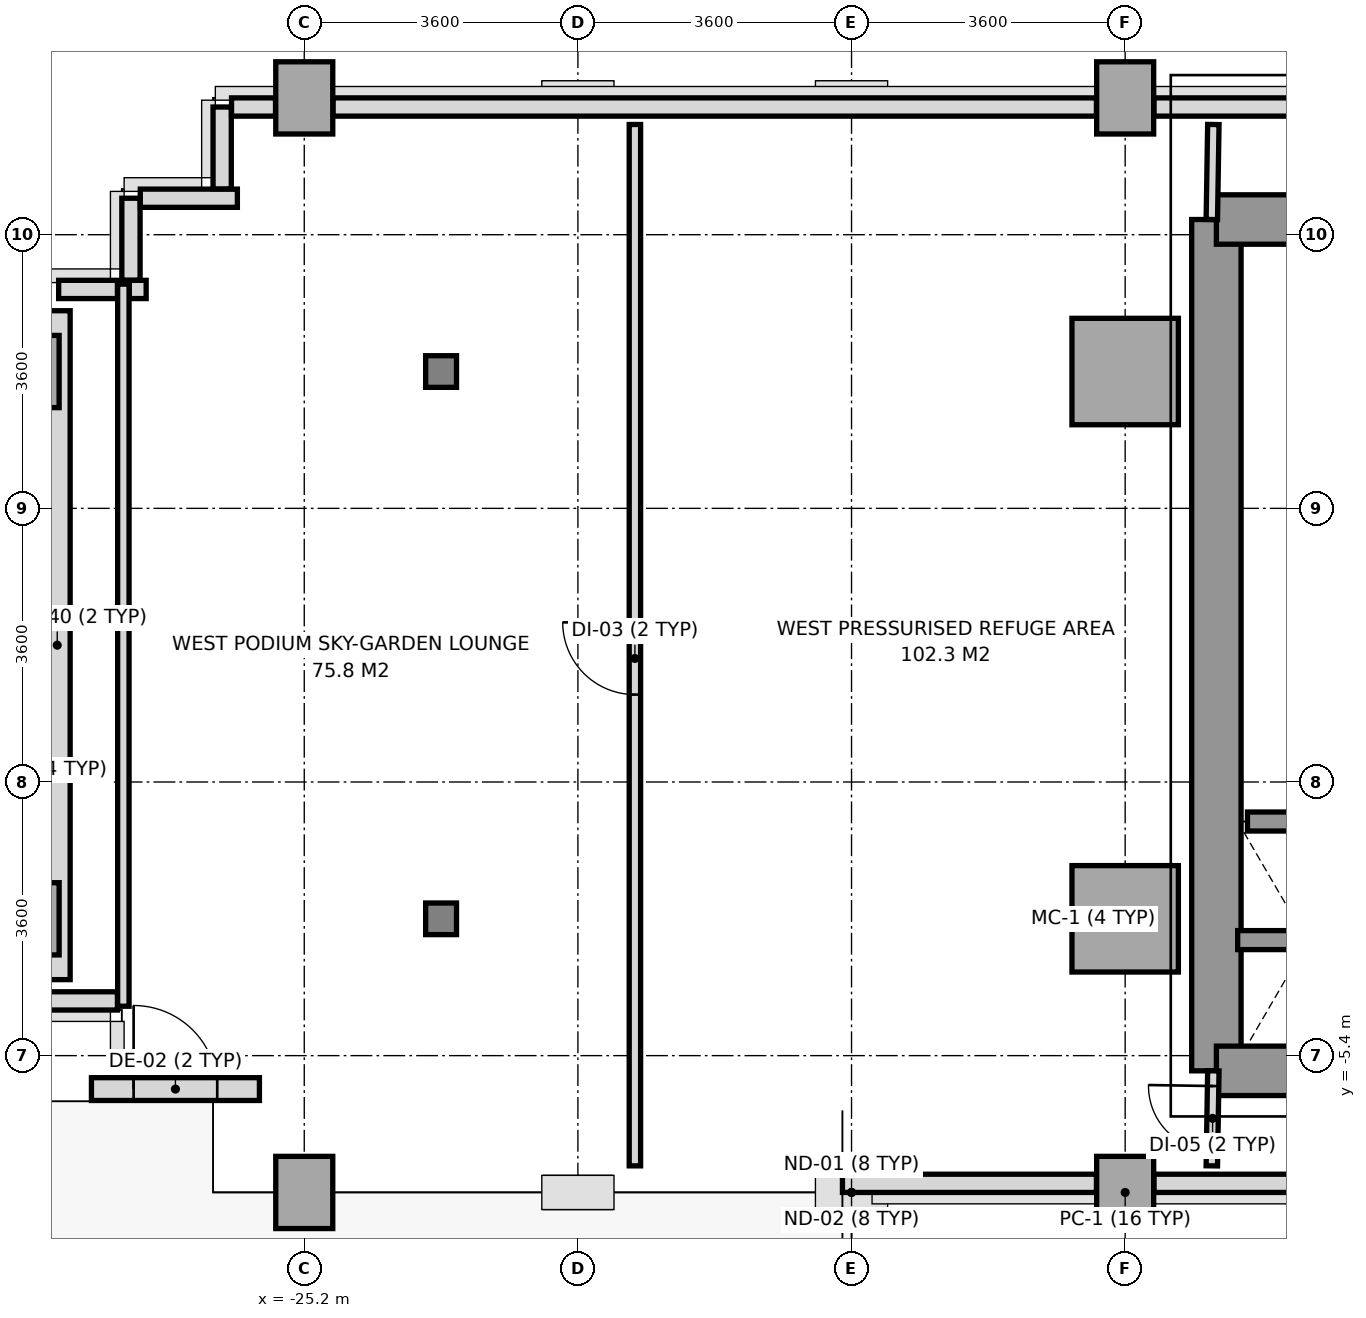
"""IFC4 building model, lengths in metres.
Left out: names, types, materials, properties, quantities, classifications, styles, units other than length and angle.
Written with IfcOpenShell. Run it as: python <this file> out.ifc"""

import sys

from ifc_helpers import new_model, si_unit, direction, frame, frame_2d, origin, origin_2d, place, context, subcontext, project, spatial, rectangle, i_section, extrude, source, transform, mapped, element, fill, save


model = new_model("IFC4")
c1 = context("Model", 3, precision=1e-05, world=origin(), true_north=direction((0.0, 1.0)))
c2 = subcontext(c1, "Body", "Model", "MODEL_VIEW")
j1 = project(units=[si_unit("LENGTHUNIT", "METRE"), si_unit("PLANEANGLEUNIT", "RADIAN")], contexts=[c1])
p1 = place(None, origin())
s1 = spatial("IfcSite", under=j1, at=p1, CompositionType="ELEMENT")
p2 = place(p1, origin())
s2 = spatial("IfcBuilding", under=s1, at=p2, CompositionType="ELEMENT")
p3 = place(p2, frame((0.0, 0.0, 25.2)))
s3 = spatial("IfcBuildingStorey", under=s2, at=p3, CompositionType="ELEMENT", Elevation=25.2)
m1 = source(origin(), c2, "Body", "SweptSolid", [
    extrude(rectangle(XDim=0.75, YDim=0.95, at=origin_2d()), origin(), (0.0, 0.0, 1.0), 5.2),
])
for number, where, z_axis, x_axis in (
    (1, (-28.8, -3.6, 0.0), (0.0, 0.0, 1.0), (1.0, 0.0, 0.0)),
    (2, (-28.8, 3.6, 0.0), (0.0, 0.0, 1.0), (1.0, 0.0, 0.0)),
    (3, (-25.2, -7.2, 0.0), (0.0, 0.0, 1.0), (1.0, 0.0, 0.0)),
    (4, (-25.2, 7.2, 0.0), (0.0, 0.0, 1.0), (1.0, 0.0, 0.0)),
):
    element("IfcColumn", number, at=place(p3, frame(where, z_axis=z_axis, x_axis=x_axis)), inside=s3, PredefinedType="COLUMN", context=c2, shape_type="MappedRepresentation", body=[
        mapped(m1, transform((0.0, 0.0, 0.0), x_axis=(1.0, 0.0, 0.0), y_axis=(0.0, 1.0, 0.0), z_axis=(0.0, 0.0, 1.0), scale=1.0)),
    ])
m2 = source(origin(), c2, "Body", "SweptSolid", [
    extrude(i_section(OverallWidth=0.406, OverallDepth=0.416, WebThickness=0.024, FlangeThickness=0.039, at=origin_2d()), origin(), (0.0, 0.0, 1.0), 5.2),
])
for number, where, z_axis, x_axis in (
    (5, (-23.4, -3.6, 0.0), (0.0, 0.0, 1.0), (1.0, 0.0, 0.0)),
    (6, (-23.4, 3.6, 0.0), (0.0, 0.0, 1.0), (1.0, 0.0, 0.0)),
):
    element("IfcColumn", number, at=place(p3, frame(where, z_axis=z_axis, x_axis=x_axis)), inside=s3, PredefinedType="COLUMN", context=c2, shape_type="MappedRepresentation", body=[
        mapped(m2, transform((0.0, 0.0, 0.0), x_axis=(1.0, 0.0, 0.0), y_axis=(0.0, 1.0, 0.0), z_axis=(0.0, 0.0, 1.0), scale=1.0)),
    ])
p4 = place(p3, frame((-14.4, -7.2, 0.0), z_axis=(0.0, 0.0, 1.0), x_axis=(1.0, 0.0, 0.0)))
e7 = element("IfcColumn", 7, at=p4, inside=s3, PredefinedType="COLUMN", context=c2, shape_type="MappedRepresentation", body=[
    mapped(m1, transform((0.0, 0.0, 0.0), x_axis=(1.0, 0.0, 0.0), y_axis=(0.0, 1.0, 0.0), z_axis=(0.0, 0.0, 1.0), scale=1.0)),
])
m3 = source(origin(), c2, "Body", "SweptSolid", [
    extrude(rectangle(XDim=1.4, YDim=1.4, at=origin_2d()), origin(), (0.0, 0.0, 1.0), 5.2),
])
for number, where, z_axis, x_axis in (
    (8, (-14.4, -3.6, 0.0), (0.0, 0.0, 1.0), (1.0, 0.0, 0.0)),
    (9, (-14.4, 3.6, 0.0), (0.0, 0.0, 1.0), (1.0, 0.0, 0.0)),
):
    element("IfcColumn", number, at=place(p3, frame(where, z_axis=z_axis, x_axis=x_axis)), inside=s3, PredefinedType="COLUMN", context=c2, shape_type="MappedRepresentation", body=[
        mapped(m3, transform((0.0, 0.0, 0.0), x_axis=(1.0, 0.0, 0.0), y_axis=(0.0, 1.0, 0.0), z_axis=(0.0, 0.0, 1.0), scale=1.0)),
    ])
p5 = place(p3, frame((-14.4, 7.2, 0.0), z_axis=(0.0, 0.0, 1.0), x_axis=(1.0, 0.0, 0.0)))
e10 = element("IfcColumn", 10, at=p5, inside=s3, PredefinedType="COLUMN", context=c2, shape_type="MappedRepresentation", body=[
    mapped(m1, transform((0.0, 0.0, 0.0), x_axis=(1.0, 0.0, 0.0), y_axis=(0.0, 1.0, 0.0), z_axis=(0.0, 0.0, 1.0), scale=1.0)),
])
p6 = place(p3, frame((-28.45, -4.4, 0.0), z_axis=(0.0, 0.0, 1.0), x_axis=(0.0, 1.0, 0.0)))
e11 = element("IfcWall", 11, at=p6, inside=s3, PredefinedType="SOLIDWALL", context=c2, shape_type="SweptSolid", body=[
    extrude(rectangle(XDim=8.8, YDim=0.34, at=frame_2d((4.4, 0.0))), origin(), (0.0, 0.0, 1.0), 4.386),
])
p7 = place(p3, frame((-28.0, -5.84, 0.0), z_axis=(0.0, 0.0, 1.0), x_axis=(1.0, 0.0, 0.0)))
e12 = element("IfcWall", 12, at=p7, inside=s3, PredefinedType="SOLIDWALL", context=c2, shape_type="SweptSolid", body=[
    extrude(rectangle(XDim=2.21, YDim=0.3, at=frame_2d((1.105, 0.0))), origin(), (0.0, 0.0, 1.0), 3.4),
])
p8 = place(p7, frame((0.555, 0.0, 0.0)))
e13 = element("IfcOpeningElement", 13, at=p8, cuts=e12, PredefinedType="OPENING", context=c2, shape_type="SweptSolid", body=[
    extrude(rectangle(XDim=1.1, YDim=2.3, at=frame_2d((0.55, 1.15))), frame((0.0, 0.16, 0.0), z_axis=(0.0, -1.0, 0.0), x_axis=(1.0, 0.0, 0.0)), (0.0, 0.0, 1.0), 0.32),
])
p9 = place(p3, frame((-9.603, -7.08, 0.0), z_axis=(0.0, 0.0, 1.0), x_axis=(-1.0, 0.0, 0.0)))
e14 = element("IfcWall", 14, at=p9, inside=s3, PredefinedType="PARAPET", context=c2, shape_type="SweptSolid", body=[
    extrude(rectangle(XDim=4.419, YDim=0.24, at=frame_2d((2.209, 0.0))), origin(), (0.0, 0.0, 1.0), 1.15),
])
p10 = place(p3, frame((-14.778, -7.08, 0.0), z_axis=(0.0, 0.0, 1.0), x_axis=(-1.0, 0.0, 0.0)))
e15 = element("IfcWall", 15, at=p10, inside=s3, PredefinedType="PARAPET", context=c2, shape_type="SweptSolid", body=[
    extrude(rectangle(XDim=3.341, YDim=0.24, at=frame_2d((1.671, 0.0))), origin(), (0.0, 0.0, 1.0), 1.15),
])
p11 = place(p3, frame((-27.658, -4.68, 0.0), z_axis=(0.0, 0.0, 1.0), x_axis=(-1.0, 0.0, 0.0)))
e16 = element("IfcWall", 16, at=p11, inside=s3, PredefinedType="PARAPET", context=c2, shape_type="SweptSolid", body=[
    extrude(rectangle(XDim=1.022, YDim=0.24, at=frame_2d((0.511, 0.0))), origin(), (0.0, 0.0, 1.0), 1.15),
])
p12 = place(p3, frame((-28.431, 4.68, 0.0), z_axis=(0.0, 0.0, 1.0), x_axis=(1.0, 0.0, 0.0)))
e17 = element("IfcWall", 17, at=p12, inside=s3, PredefinedType="PARAPET", context=c2, shape_type="SweptSolid", body=[
    extrude(rectangle(XDim=0.773, YDim=0.24, at=frame_2d((0.387, 0.0))), origin(), (0.0, 0.0, 1.0), 1.15),
])
p13 = place(p3, frame((-27.502, 4.68, 0.0), z_axis=(0.0, 0.0, 1.0), x_axis=(1.0, 0.0, 0.0)))
e18 = element("IfcWall", 18, at=p13, inside=s3, PredefinedType="PARAPET", context=c2, shape_type="SweptSolid", body=[
    extrude(rectangle(XDim=0.222, YDim=0.24, at=frame_2d((0.111, 0.0))), origin(), (0.0, 0.0, 1.0), 1.15),
])
p14 = place(p3, frame((-27.48, 4.803, 0.0), z_axis=(0.0, 0.0, 1.0), x_axis=(0.0, 1.0, 0.0)))
e19 = element("IfcWall", 19, at=p14, inside=s3, PredefinedType="PARAPET", context=c2, shape_type="SweptSolid", body=[
    extrude(rectangle(XDim=1.077, YDim=0.24, at=frame_2d((0.539, 0.0))), origin(), (0.0, 0.0, 1.0), 1.15),
])
p15 = place(p3, frame((-27.357, 5.88, 0.0), z_axis=(0.0, 0.0, 1.0), x_axis=(1.0, 0.0, 0.0)))
e20 = element("IfcWall", 20, at=p15, inside=s3, PredefinedType="PARAPET", context=c2, shape_type="SweptSolid", body=[
    extrude(rectangle(XDim=1.277, YDim=0.24, at=frame_2d((0.638, 0.0))), origin(), (0.0, 0.0, 1.0), 1.15),
])
p16 = place(p3, frame((-26.28, 6.003, 0.0), z_axis=(0.0, 0.0, 1.0), x_axis=(0.0, 1.0, 0.0)))
e21 = element("IfcWall", 21, at=p16, inside=s3, PredefinedType="PARAPET", context=c2, shape_type="SweptSolid", body=[
    extrude(rectangle(XDim=1.077, YDim=0.24, at=frame_2d((0.539, 0.0))), origin(), (0.0, 0.0, 1.0), 1.15),
])
p17 = place(p3, frame((-26.157, 7.08, 0.0), z_axis=(0.0, 0.0, 1.0), x_axis=(1.0, 0.0, 0.0)))
e22 = element("IfcWall", 22, at=p17, inside=s3, PredefinedType="PARAPET", context=c2, shape_type="SweptSolid", body=[
    extrude(rectangle(XDim=0.579, YDim=0.24, at=frame_2d((0.29, 0.0))), origin(), (0.0, 0.0, 1.0), 1.15),
])
p18 = place(p3, frame((-24.822, 7.08, 0.0), z_axis=(0.0, 0.0, 1.0), x_axis=(1.0, 0.0, 0.0)))
e23 = element("IfcWall", 23, at=p18, inside=s3, PredefinedType="PARAPET", context=c2, shape_type="SweptSolid", body=[
    extrude(rectangle(XDim=10.044, YDim=0.24, at=frame_2d((5.022, 0.0))), origin(), (0.0, 0.0, 1.0), 1.15),
])
p19 = place(p3, frame((-14.022, 7.08, 0.0), z_axis=(0.0, 0.0, 1.0), x_axis=(1.0, 0.0, 0.0)))
e24 = element("IfcWall", 24, at=p19, inside=s3, PredefinedType="PARAPET", context=c2, shape_type="SweptSolid", body=[
    extrude(rectangle(XDim=2.727, YDim=0.24, at=frame_2d((1.364, 0.0))), origin(), (0.0, 0.0, 1.0), 1.15),
])
p20 = place(p3, frame((-13.2, -5.6, 0.0), z_axis=(0.0, 0.0, 1.0), x_axis=(0.0, 1.0, 0.0)))
e25 = element("IfcWall", 25, at=p20, inside=s3, PredefinedType="SHEAR", context=c2, shape_type="SweptSolid", body=[
    extrude(rectangle(XDim=11.2, YDim=0.65, at=frame_2d((5.6, 0.0))), origin(), (0.0, 0.0, 1.0), 5.2),
])
p21 = place(p3, frame((-13.2, 5.6, 0.0), z_axis=(0.0, 0.0, 1.0), x_axis=(1.0, 0.0, 0.0)))
e26 = element("IfcWall", 26, at=p21, inside=s3, PredefinedType="SHEAR", context=c2, shape_type="SweptSolid", body=[
    extrude(rectangle(XDim=1.819, YDim=0.65, at=frame_2d((0.909, 0.0))), origin(), (0.0, 0.0, 1.0), 5.2),
])
p22 = place(p3, frame((-13.2, -5.6, 0.0), z_axis=(0.0, 0.0, 1.0), x_axis=(1.0, 0.0, 0.0)))
e27 = element("IfcWall", 27, at=p22, inside=s3, PredefinedType="SHEAR", context=c2, shape_type="SweptSolid", body=[
    extrude(rectangle(XDim=7.8, YDim=0.65, at=frame_2d((3.9, 0.0))), origin(), (0.0, 0.0, 1.0), 5.2),
])
p23 = place(p22, frame((3.6, 0.0, 0.0)))
e28 = element("IfcOpeningElement", 28, at=p23, cuts=e27, PredefinedType="OPENING", context=c2, shape_type="SweptSolid", body=[
    extrude(rectangle(XDim=1.2, YDim=2.2, at=frame_2d((0.6, 1.1))), frame((0.0, 0.335, 0.0), z_axis=(0.0, -1.0, 0.0), x_axis=(1.0, 0.0, 0.0)), (0.0, 0.0, 1.0), 0.67),
])
p24 = place(p3, frame((-12.92, -3.88, 0.0), z_axis=(0.0, 0.0, 1.0), x_axis=(1.0, 0.0, 0.0)))
e29 = element("IfcWall", 29, at=p24, inside=s3, PredefinedType="SOLIDWALL", context=c2, shape_type="SweptSolid", body=[
    extrude(rectangle(XDim=1.84, YDim=0.25, at=frame_2d((0.92, 0.0))), origin(), (0.0, 0.0, 1.0), 5.2),
])
p25 = place(p3, frame((-12.791, -2.32, 0.0), z_axis=(0.0, 0.0, 1.0), x_axis=(1.0, 0.0, 0.0)))
e30 = element("IfcWall", 30, at=p25, inside=s3, PredefinedType="SOLIDWALL", context=c2, shape_type="SweptSolid", body=[
    extrude(rectangle(XDim=1.582, YDim=0.25, at=frame_2d((0.791, 0.0))), origin(), (0.0, 0.0, 1.0), 5.2),
])
p26 = place(p3, frame((-27.58, -4.75, 0.0), z_axis=(0.0, 0.0, 1.0), x_axis=(0.0, 1.0, 0.0)))
e31 = element("IfcWall", 31, at=p26, inside=s3, PredefinedType="PARTITIONING", context=c2, shape_type="SweptSolid", body=[
    extrude(rectangle(XDim=9.5, YDim=0.15, at=frame_2d((4.75, 0.0))), origin(), (0.0, 0.0, 1.0), 4.386),
])
p27 = place(p3, frame((-13.26, -6.85, 0.0), z_axis=(0.0, 0.0, 1.0), x_axis=(0.016013571389, 0.999871774545, 0.0)))
e32 = element("IfcWall", 32, at=p27, inside=s3, PredefinedType="PARTITIONING", context=c2, shape_type="SweptSolid", body=[
    extrude(rectangle(XDim=1.25, YDim=0.15, at=frame_2d((0.625, 0.0))), origin(), (0.0, 0.0, 1.0), 5.2),
])
p28 = place(p27, frame((0.2, 0.0, 0.0)))
e33 = element("IfcOpeningElement", 33, at=p28, cuts=e32, PredefinedType="OPENING", context=c2, shape_type="SweptSolid", body=[
    extrude(rectangle(XDim=0.85, YDim=2.1, at=frame_2d((0.425, 1.05))), frame((0.0, 0.085, 0.0), z_axis=(0.0, -1.0, 0.0), x_axis=(1.0, 0.0, 0.0)), (0.0, 0.0, 1.0), 0.17),
])
p29 = place(p3, frame((-13.26, 5.6, 0.0), z_axis=(0.0, 0.0, 1.0), x_axis=(0.016013571389, 0.999871774545, 0.0)))
e34 = element("IfcWall", 34, at=p29, inside=s3, PredefinedType="PARTITIONING", context=c2, shape_type="SweptSolid", body=[
    extrude(rectangle(XDim=1.25, YDim=0.15, at=frame_2d((0.625, 0.0))), origin(), (0.0, 0.0, 1.0), 5.2),
])
p30 = place(p3, frame((-20.85, -6.85, 0.0), z_axis=(0.0, 0.0, 1.0), x_axis=(0.0, 1.0, 0.0)))
e35 = element("IfcWall", 35, at=p30, inside=s3, PredefinedType="PARTITIONING", context=c2, shape_type="SweptSolid", body=[
    extrude(rectangle(XDim=13.7, YDim=0.15, at=frame_2d((6.85, 0.0))), origin(), (0.0, 0.0, 1.0), 3.4),
])
p31 = place(p30, frame((6.2, 0.0, 0.0)))
e36 = element("IfcOpeningElement", 36, at=p31, cuts=e35, PredefinedType="OPENING", context=c2, shape_type="SweptSolid", body=[
    extrude(rectangle(XDim=0.95, YDim=2.15, at=frame_2d((0.475, 1.075))), frame((0.0, 0.085, 0.0), z_axis=(0.0, -1.0, 0.0), x_axis=(1.0, 0.0, 0.0)), (0.0, 0.0, 1.0), 0.17),
])
m4 = source(origin(), c2, "Body", "SweptSolid", [
    extrude(rectangle(XDim=1.1, YDim=2.3, at=frame_2d((0.55, 1.15))), frame((0.0, 0.025, 0.0), z_axis=(0.0, -1.0, 0.0), x_axis=(1.0, 0.0, 0.0)), (0.0, 0.0, 1.0), 0.05),
])
p32 = place(p8, frame((1.1, 0.0, 0.0), z_axis=(0.0, 0.0, 1.0), x_axis=(-1.0, 0.0, 0.0)))
e37 = element("IfcDoor", 37, at=p32, inside=s3, OperationType="SINGLE_SWING_LEFT", PredefinedType="DOOR", context=c2, shape_type="MappedRepresentation", body=[
    mapped(m4, transform((0.0, 0.0, 0.0), x_axis=(1.0, 0.0, 0.0), y_axis=(0.0, 1.0, 0.0), z_axis=(0.0, 0.0, 1.0), scale=1.0)),
])
fill(e13, e37)
m5 = source(origin(), c2, "Body", "SweptSolid", [
    extrude(rectangle(XDim=0.95, YDim=2.15, at=frame_2d((0.475, 1.075))), frame((0.0, 0.025, 0.0), z_axis=(0.0, -1.0, 0.0), x_axis=(1.0, 0.0, 0.0)), (0.0, 0.0, 1.0), 0.05),
])
p33 = place(p31, origin())
e38 = element("IfcDoor", 38, at=p33, inside=s3, OperationType="SINGLE_SWING_RIGHT", PredefinedType="DOOR", context=c2, shape_type="MappedRepresentation", body=[
    mapped(m5, transform((0.0, 0.0, 0.0), x_axis=(1.0, 0.0, 0.0), y_axis=(0.0, 1.0, 0.0), z_axis=(0.0, 0.0, 1.0), scale=1.0)),
])
fill(e36, e38)
m6 = source(origin(), c2, "Body", "SweptSolid", [
    extrude(rectangle(XDim=0.85, YDim=2.1, at=frame_2d((0.425, 1.05))), frame((0.0, 0.025, 0.0), z_axis=(0.0, -1.0, 0.0), x_axis=(1.0, 0.0, 0.0)), (0.0, 0.0, 1.0), 0.05),
])
p34 = place(p28, origin())
e39 = element("IfcDoor", 39, at=p34, inside=s3, OperationType="SINGLE_SWING_RIGHT", PredefinedType="DOOR", context=c2, shape_type="MappedRepresentation", body=[
    mapped(m6, transform((0.0, 0.0, 0.0), x_axis=(1.0, 0.0, 0.0), y_axis=(0.0, 1.0, 0.0), z_axis=(0.0, 0.0, 1.0), scale=1.0)),
])
fill(e33, e39)
save(model, sys.argv[1])
